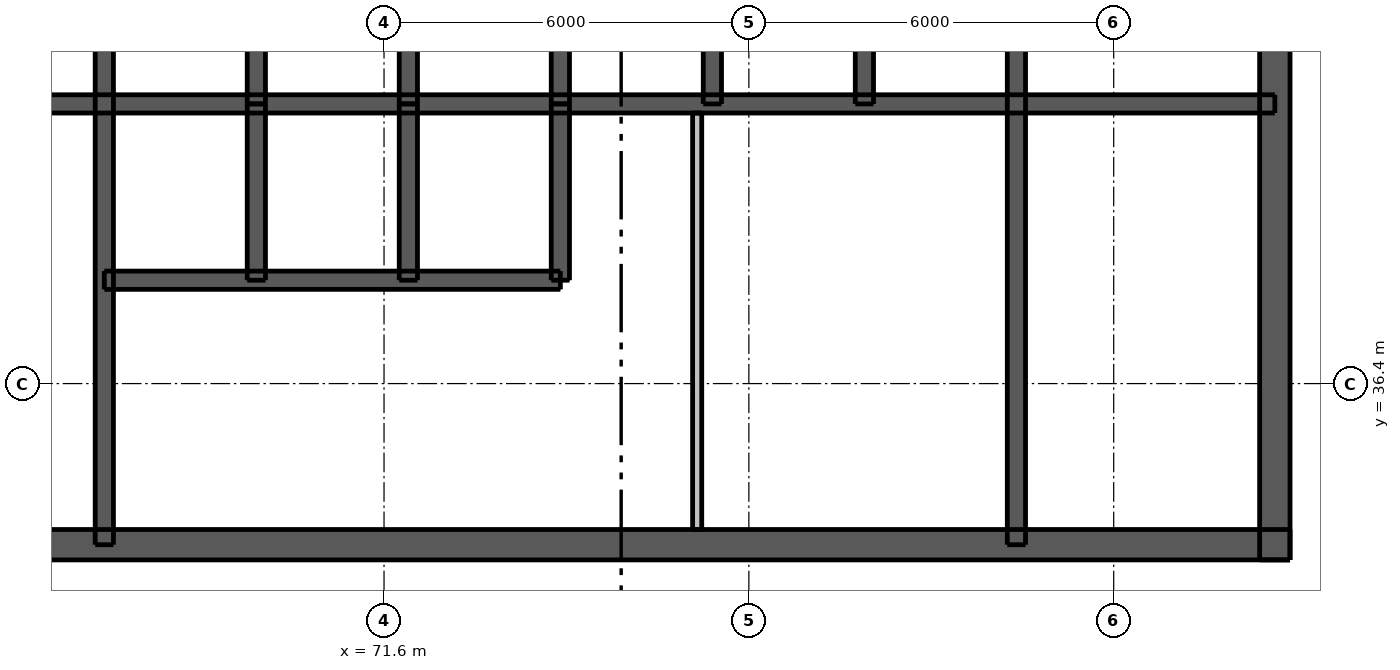
"""IFC4 building model, lengths in metres.
Left out: names, types, materials, properties, quantities, classifications, styles, units other than length and angle.
Written with IfcOpenShell. Run it as: python <this file> out.ifc"""

import sys

from ifc_helpers import new_model, si_unit, direction, frame, frame_2d, origin, place, context, subcontext, project, spatial, rectangle, extrude, element, fill, save


model = new_model("IFC4")
c1 = context("Model", 3, precision=1e-05, world=origin(), true_north=direction((0.0, 1.0)))
c2 = subcontext(c1, "Body", "Model", "MODEL_VIEW")
j1 = project(units=[si_unit("LENGTHUNIT", "METRE"), si_unit("PLANEANGLEUNIT", "RADIAN")], contexts=[c1])
p1 = place(None, origin())
s1 = spatial("IfcSite", under=j1, at=p1, CompositionType="ELEMENT")
p2 = place(p1, origin())
s2 = spatial("IfcBuilding", under=s1, at=p2, CompositionType="ELEMENT")
p3 = place(p2, frame((0.0, 0.0, 245.5)))
s3 = spatial("IfcBuildingStorey", under=s2, at=p3, CompositionType="ELEMENT", Elevation=245.5)
p4 = place(p3, frame((62.5, 33.75, 0.0), z_axis=(0.0, 0.0, 1.0), x_axis=(1.0, 0.0, 0.0)))
e1 = element("IfcWall", 1, at=p4, inside=s3, PredefinedType="SHEAR", context=c2, shape_type="SweptSolid", body=[
    extrude(rectangle(XDim=24.0, YDim=0.5, at=frame_2d((12.0, 0.0))), origin(), (0.0, 0.0, 1.0), 3.05),
])
p5 = place(p4, frame((1.875, 0.0, 0.0)))
e2 = element("IfcOpeningElement", 2, at=p5, cuts=e1, PredefinedType="OPENING", context=c2, shape_type="SweptSolid", body=[
    extrude(rectangle(XDim=1.1, YDim=2.1, at=frame_2d((0.55, 1.05))), frame((0.0, 0.26, 0.0), z_axis=(0.0, -1.0, 0.0), x_axis=(1.0, 0.0, 0.0)), (0.0, 0.0, 1.0), 0.52),
])
p6 = place(p4, frame((21.025, 0.0, 0.0)))
e3 = element("IfcOpeningElement", 3, at=p6, cuts=e1, PredefinedType="OPENING", context=c2, shape_type="SweptSolid", body=[
    extrude(rectangle(XDim=1.1, YDim=2.1, at=frame_2d((0.55, 1.05))), frame((0.0, 0.26, 0.0), z_axis=(0.0, -1.0, 0.0), x_axis=(1.0, 0.0, 0.0)), (0.0, 0.0, 1.0), 0.52),
])
p7 = place(p4, frame((8.0, 0.0, 0.0)))
e4 = element("IfcOpeningElement", 4, at=p7, cuts=e1, PredefinedType="OPENING", context=c2, shape_type="SweptSolid", body=[
    extrude(rectangle(XDim=1.1, YDim=2.1, at=frame_2d((0.55, 1.05))), frame((0.0, 0.26, 0.0), z_axis=(0.0, -1.0, 0.0), x_axis=(1.0, 0.0, 0.0)), (0.0, 0.0, 1.0), 0.52),
])
p8 = place(p4, frame((16.387, 0.0, 0.0)))
e5 = element("IfcOpeningElement", 5, at=p8, cuts=e1, PredefinedType="OPENING", context=c2, shape_type="SweptSolid", body=[
    extrude(rectangle(XDim=0.9, YDim=2.1, at=frame_2d((0.45, 1.05))), frame((0.0, 0.26, 0.0), z_axis=(0.0, -1.0, 0.0), x_axis=(1.0, 0.0, 0.0)), (0.0, 0.0, 1.0), 0.52),
])
p9 = place(p3, frame((86.25, 33.5, 0.0), z_axis=(0.0, 0.0, 1.0), x_axis=(0.0, 1.0, 0.0)))
e6 = element("IfcWall", 6, at=p9, inside=s3, PredefinedType="SHEAR", context=c2, shape_type="SweptSolid", body=[
    extrude(rectangle(XDim=24.0, YDim=0.5, at=frame_2d((12.0, 0.0))), origin(), (0.0, 0.0, 1.0), 3.05),
])
p10 = place(p9, frame((11.2, 0.0, 0.0)))
e7 = element("IfcOpeningElement", 7, at=p10, cuts=e6, PredefinedType="OPENING", context=c2, shape_type="SweptSolid", body=[
    extrude(rectangle(XDim=1.6, YDim=2.1, at=frame_2d((0.8, 1.05))), frame((0.0, 0.26, 0.0), z_axis=(0.0, -1.0, 0.0), x_axis=(1.0, 0.0, 0.0)), (0.0, 0.0, 1.0), 0.52),
])
p11 = place(p3, frame((62.75, 41.0, 0.0), z_axis=(0.0, 0.0, 1.0), x_axis=(1.0, 0.0, 0.0)))
e8 = element("IfcWall", 8, at=p11, inside=s3, PredefinedType="SHEAR", context=c2, shape_type="SweptSolid", body=[
    extrude(rectangle(XDim=23.5, YDim=0.3, at=frame_2d((11.75, 0.0))), origin(), (0.0, 0.0, 1.0), 3.05),
])
p12 = place(p3, frame((67.0, 33.75, 0.0), z_axis=(0.0, 0.0, 1.0), x_axis=(0.0, 1.0, 0.0)))
e9 = element("IfcWall", 9, at=p12, inside=s3, PredefinedType="SHEAR", context=c2, shape_type="SweptSolid", body=[
    extrude(rectangle(XDim=10.15, YDim=0.3, at=frame_2d((5.075, 0.0))), origin(), (0.0, 0.0, 1.0), 3.05),
])
p13 = place(p12, frame((0.45, 0.0, 0.0)))
e10 = element("IfcOpeningElement", 10, at=p13, cuts=e9, PredefinedType="OPENING", context=c2, shape_type="SweptSolid", body=[
    extrude(rectangle(XDim=1.1, YDim=2.1, at=frame_2d((0.55, 1.05))), frame((0.0, 0.16, 0.0), z_axis=(0.0, -1.0, 0.0), x_axis=(1.0, 0.0, 0.0)), (0.0, 0.0, 1.0), 0.32),
])
p14 = place(p3, frame((82.0, 33.75, 0.0), z_axis=(0.0, 0.0, 1.0), x_axis=(0.0, 1.0, 0.0)))
e11 = element("IfcWall", 11, at=p14, inside=s3, PredefinedType="SHEAR", context=c2, shape_type="SweptSolid", body=[
    extrude(rectangle(XDim=10.15, YDim=0.3, at=frame_2d((5.075, 0.0))), origin(), (0.0, 0.0, 1.0), 3.05),
])
for number, where, z_axis, x_axis in (
    (12, (69.5, 41.0, 0.0), (0.0, 0.0, 1.0), (0.0, 1.0, 0.0)),
    (13, (72.0, 41.0, 0.0), (0.0, 0.0, 1.0), (0.0, 1.0, 0.0)),
    (14, (74.5, 41.0, 0.0), (0.0, 0.0, 1.0), (0.0, 1.0, 0.0)),
    (15, (77.0, 41.0, 0.0), (0.0, 0.0, 1.0), (0.0, 1.0, 0.0)),
    (16, (79.5, 41.0, 0.0), (0.0, 0.0, 1.0), (0.0, 1.0, 0.0)),
):
    element("IfcWall", number, at=place(p3, frame(where, z_axis=z_axis, x_axis=x_axis)), inside=s3, PredefinedType="SHEAR", context=c2, shape_type="SweptSolid", body=[
        extrude(rectangle(XDim=2.9, YDim=0.3, at=frame_2d((1.45, 0.0))), origin(), (0.0, 0.0, 1.0), 3.05),
    ])
p15 = place(p3, frame((67.0, 38.1, 0.0), z_axis=(0.0, 0.0, 1.0), x_axis=(1.0, 0.0, 0.0)))
e17 = element("IfcWall", 17, at=p15, inside=s3, PredefinedType="SHEAR", context=c2, shape_type="SweptSolid", body=[
    extrude(rectangle(XDim=7.5, YDim=0.3, at=frame_2d((3.75, 0.0))), origin(), (0.0, 0.0, 1.0), 3.05),
])
p16 = place(p15, frame((0.7, 0.0, 0.0)))
e18 = element("IfcOpeningElement", 18, at=p16, cuts=e17, PredefinedType="OPENING", context=c2, shape_type="SweptSolid", body=[
    extrude(rectangle(XDim=1.1, YDim=2.1, at=frame_2d((0.55, 1.05))), frame((0.0, 0.16, 0.0), z_axis=(0.0, -1.0, 0.0), x_axis=(1.0, 0.0, 0.0)), (0.0, 0.0, 1.0), 0.32),
])
p17 = place(p15, frame((3.2, 0.0, 0.0)))
e19 = element("IfcOpeningElement", 19, at=p17, cuts=e17, PredefinedType="OPENING", context=c2, shape_type="SweptSolid", body=[
    extrude(rectangle(XDim=1.1, YDim=2.1, at=frame_2d((0.55, 1.05))), frame((0.0, 0.16, 0.0), z_axis=(0.0, -1.0, 0.0), x_axis=(1.0, 0.0, 0.0)), (0.0, 0.0, 1.0), 0.32),
])
p18 = place(p15, frame((5.65, 0.0, 0.0)))
e20 = element("IfcOpeningElement", 20, at=p18, cuts=e17, PredefinedType="OPENING", context=c2, shape_type="SweptSolid", body=[
    extrude(rectangle(XDim=1.2, YDim=2.1, at=frame_2d((0.6, 1.05))), frame((0.0, 0.16, 0.0), z_axis=(0.0, -1.0, 0.0), x_axis=(1.0, 0.0, 0.0)), (0.0, 0.0, 1.0), 0.32),
])
for number, where, z_axis, x_axis in (
    (21, (69.5, 38.1, 0.0), (0.0, 0.0, 1.0), (0.0, 1.0, 0.0)),
    (22, (72.0, 38.1, 0.0), (0.0, 0.0, 1.0), (0.0, 1.0, 0.0)),
    (23, (74.5, 38.1, 0.0), (0.0, 0.0, 1.0), (0.0, 1.0, 0.0)),
):
    element("IfcWall", number, at=place(p3, frame(where, z_axis=z_axis, x_axis=x_axis)), inside=s3, PredefinedType="SHEAR", context=c2, shape_type="SweptSolid", body=[
        extrude(rectangle(XDim=2.9, YDim=0.3, at=frame_2d((1.45, 0.0))), origin(), (0.0, 0.0, 1.0), 3.05),
    ])
p19 = place(p3, frame((76.75, 34.0, 0.0), z_axis=(0.0, 0.0, 1.0), x_axis=(0.0, 1.0, 0.0)))
e24 = element("IfcWall", 24, at=p19, inside=s3, PredefinedType="PLUMBINGWALL", context=c2, shape_type="SweptSolid", body=[
    extrude(rectangle(XDim=6.85, YDim=0.15, at=frame_2d((3.425, 0.0))), origin(), (0.0, 0.0, 1.0), 3.05),
])
p20 = place(p6, origin())
e25 = element("IfcDoor", 25, at=p20, inside=s3, OperationType="SINGLE_SWING_RIGHT", PredefinedType="DOOR", context=c2, shape_type="SweptSolid", body=[
    extrude(rectangle(XDim=1.1, YDim=2.1, at=frame_2d((0.55, 1.05))), frame((0.0, 0.237, 0.0), z_axis=(0.0, -1.0, 0.0), x_axis=(1.0, 0.0, 0.0)), (0.0, 0.0, 1.0), 0.05),
])
fill(e3, e25)
p21 = place(p7, origin())
e26 = element("IfcDoor", 26, at=p21, inside=s3, OperationType="SINGLE_SWING_LEFT", PredefinedType="DOOR", context=c2, shape_type="SweptSolid", body=[
    extrude(rectangle(XDim=1.1, YDim=2.1, at=frame_2d((0.55, 1.05))), frame((0.0, 0.237, 0.0), z_axis=(0.0, -1.0, 0.0), x_axis=(1.0, 0.0, 0.0)), (0.0, 0.0, 1.0), 0.05),
])
fill(e4, e26)
p22 = place(p13, origin())
e27 = element("IfcDoor", 27, at=p22, inside=s3, OperationType="SINGLE_SWING_RIGHT", PredefinedType="DOOR", context=c2, shape_type="SweptSolid", body=[
    extrude(rectangle(XDim=1.1, YDim=2.1, at=frame_2d((0.55, 1.05))), frame((0.0, -0.087, 0.0), z_axis=(0.0, -1.0, 0.0), x_axis=(1.0, 0.0, 0.0)), (0.0, 0.0, 1.0), 0.05),
])
fill(e10, e27)
p23 = place(p8, origin())
e28 = element("IfcDoor", 28, at=p23, inside=s3, OperationType="SINGLE_SWING_LEFT", PredefinedType="DOOR", context=c2, shape_type="SweptSolid", body=[
    extrude(rectangle(XDim=0.9, YDim=2.1, at=frame_2d((0.45, 1.05))), frame((0.0, 0.237, 0.0), z_axis=(0.0, -1.0, 0.0), x_axis=(1.0, 0.0, 0.0)), (0.0, 0.0, 1.0), 0.05),
])
fill(e5, e28)
p24 = place(p16, origin())
e29 = element("IfcDoor", 29, at=p24, inside=s3, OperationType="DOUBLE_DOOR_SLIDING", PredefinedType="DOOR", context=c2, shape_type="SweptSolid", body=[
    extrude(rectangle(XDim=1.1, YDim=2.1, at=frame_2d((0.55, 1.05))), frame((0.0, 0.025, 0.0), z_axis=(0.0, -1.0, 0.0), x_axis=(1.0, 0.0, 0.0)), (0.0, 0.0, 1.0), 0.05),
])
fill(e18, e29)
p25 = place(p17, origin())
e30 = element("IfcDoor", 30, at=p25, inside=s3, OperationType="DOUBLE_DOOR_SLIDING", PredefinedType="DOOR", context=c2, shape_type="SweptSolid", body=[
    extrude(rectangle(XDim=1.1, YDim=2.1, at=frame_2d((0.55, 1.05))), frame((0.0, 0.025, 0.0), z_axis=(0.0, -1.0, 0.0), x_axis=(1.0, 0.0, 0.0)), (0.0, 0.0, 1.0), 0.05),
])
fill(e19, e30)
p26 = place(p18, origin())
e31 = element("IfcDoor", 31, at=p26, inside=s3, OperationType="DOUBLE_DOOR_SLIDING", PredefinedType="DOOR", context=c2, shape_type="SweptSolid", body=[
    extrude(rectangle(XDim=1.2, YDim=2.1, at=frame_2d((0.6, 1.05))), frame((0.0, 0.025, 0.0), z_axis=(0.0, -1.0, 0.0), x_axis=(1.0, 0.0, 0.0)), (0.0, 0.0, 1.0), 0.05),
])
fill(e20, e31)
save(model, sys.argv[1])
